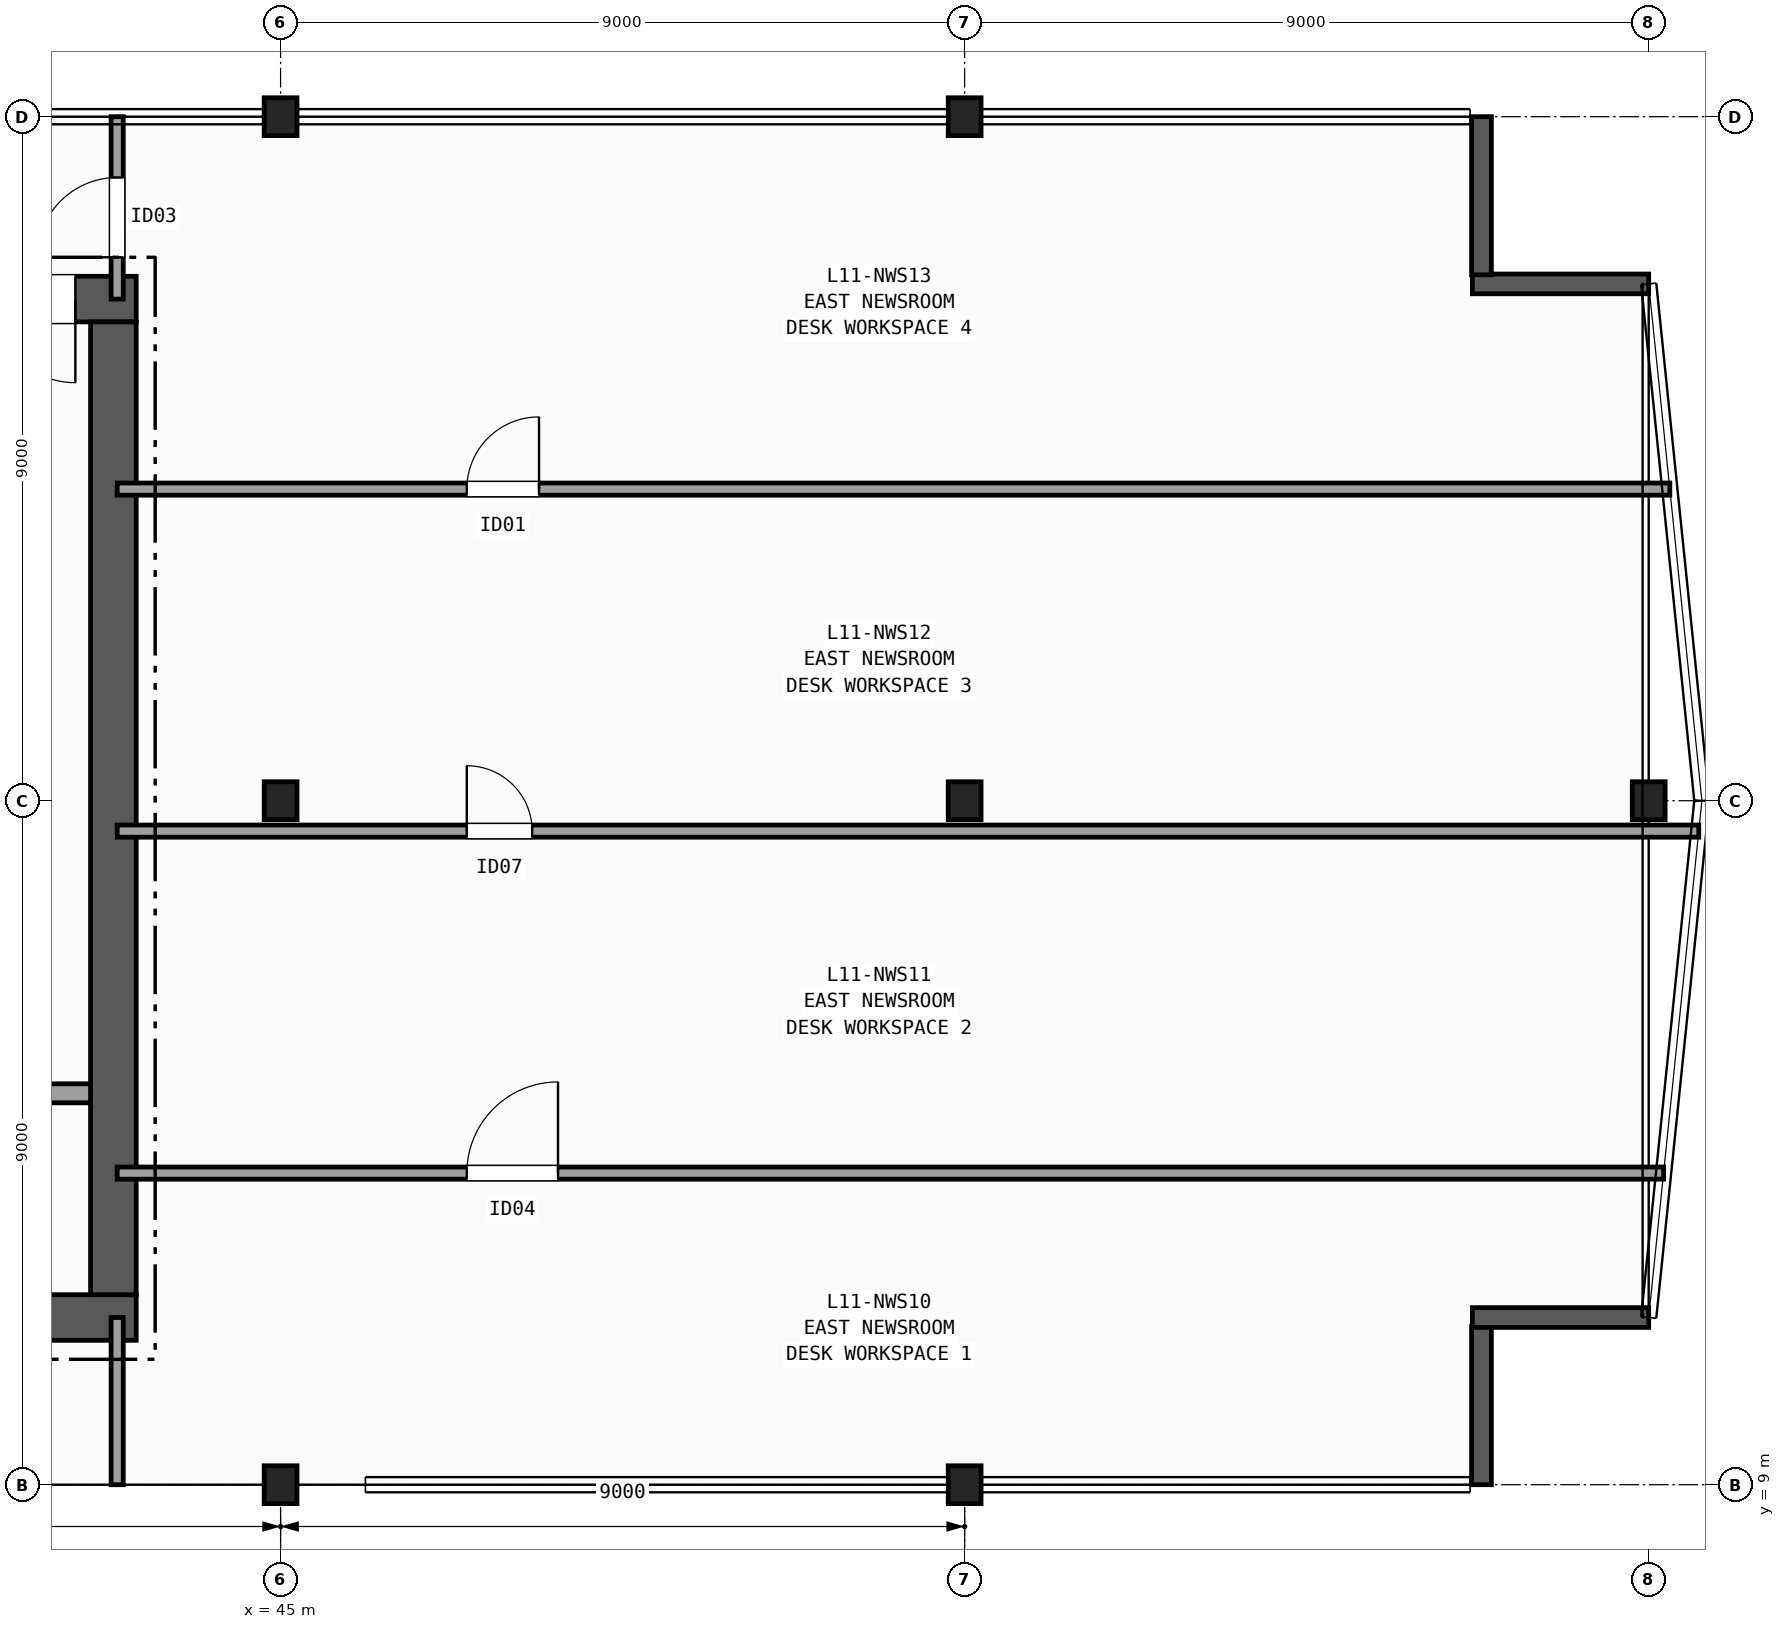
"""IFC4 building model, lengths in metres.
Left out: names, types, materials, properties, quantities, classifications, styles, units other than length and angle.
Written with IfcOpenShell. Run it as: python <this file> out.ifc"""

import sys

from ifc_helpers import new_model, si_unit, direction, frame, frame_2d, origin, origin_2d, place, context, subcontext, project, spatial, rectangle, i_section, extrude, element, fill, save


model = new_model("IFC4")
c1 = context("Model", 3, precision=1e-05, world=origin(), true_north=direction((0.0, 1.0)))
c2 = subcontext(c1, "Body", "Model", "MODEL_VIEW")
j1 = project(units=[si_unit("LENGTHUNIT", "METRE"), si_unit("PLANEANGLEUNIT", "RADIAN")], contexts=[c1])
p1 = place(None, origin())
s1 = spatial("IfcSite", under=j1, at=p1, CompositionType="ELEMENT")
p2 = place(p1, origin())
s2 = spatial("IfcBuilding", under=s1, at=p2, CompositionType="ELEMENT")
p3 = place(p2, frame((0.0, 0.0, 50.8)))
s3 = spatial("IfcBuildingStorey", under=s2, at=p3, CompositionType="ELEMENT", Elevation=50.8)
for number, where, z_axis, x_axis in (
    (1, (45.0, 9.0, 0.0), (0.0, 0.0, 1.0), (1.0, 0.0, 0.0)),
    (2, (45.0, 18.0, 0.0), (0.0, 0.0, 1.0), (1.0, 0.0, 0.0)),
    (3, (45.0, 27.0, 0.0), (0.0, 0.0, 1.0), (1.0, 0.0, 0.0)),
    (4, (54.0, 9.0, 0.0), (0.0, 0.0, 1.0), (1.0, 0.0, 0.0)),
    (5, (54.0, 18.0, 0.0), (0.0, 0.0, 1.0), (1.0, 0.0, 0.0)),
    (6, (54.0, 27.0, 0.0), (0.0, 0.0, 1.0), (1.0, 0.0, 0.0)),
    (7, (63.0, 18.0, 0.0), (0.0, 0.0, 1.0), (1.0, 0.0, 0.0)),
):
    element("IfcColumn", number, at=place(p3, frame(where, z_axis=z_axis, x_axis=x_axis)), inside=s3, PredefinedType="COLUMN", context=c2, shape_type="SweptSolid", body=[
        extrude(i_section(OverallWidth=0.432, OverallDepth=0.498, WebThickness=0.056, FlangeThickness=0.089, FilletRadius=0.015, at=origin_2d()), origin(), (0.0, 0.0, 1.0), 3.7),
    ])
p4 = place(p3, frame((60.8, 9.0, 0.0), z_axis=(0.0, 0.0, 1.0), x_axis=(0.0, 1.0, 0.0)))
e8 = element("IfcWall", 8, at=p4, inside=s3, PredefinedType="SOLIDWALL", context=c2, shape_type="SweptSolid", body=[
    extrude(rectangle(XDim=2.08, YDim=0.26, at=frame_2d((1.04, 0.0))), origin(), (0.0, 0.0, 1.0), 3.42),
])
for number, where, z_axis, x_axis in (
    (9, (60.68, 11.2, 0.0), (0.0, 0.0, 1.0), (1.0, 0.0, 0.0)),
    (10, (63.0, 24.8, 0.0), (0.0, 0.0, 1.0), (-1.0, 0.0, 0.0)),
):
    element("IfcWall", number, at=place(p3, frame(where, z_axis=z_axis, x_axis=x_axis)), inside=s3, PredefinedType="SOLIDWALL", context=c2, shape_type="SweptSolid", body=[
        extrude(rectangle(XDim=2.32, YDim=0.26, at=frame_2d((1.16, 0.0))), origin(), (0.0, 0.0, 1.0), 3.42),
    ])
p5 = place(p3, frame((60.8, 24.92, 0.0), z_axis=(0.0, 0.0, 1.0), x_axis=(0.0, 1.0, 0.0)))
e11 = element("IfcWall", 11, at=p5, inside=s3, PredefinedType="SOLIDWALL", context=c2, shape_type="SweptSolid", body=[
    extrude(rectangle(XDim=2.08, YDim=0.26, at=frame_2d((1.04, 0.0))), origin(), (0.0, 0.0, 1.0), 3.42),
])
p6 = place(p3, frame((29.1, 11.2, 0.0), z_axis=(0.0, 0.0, 1.0), x_axis=(1.0, 0.0, 0.0)))
e12 = element("IfcWall", 12, at=p6, inside=s3, PredefinedType="SHEAR", context=c2, shape_type="SweptSolid", body=[
    extrude(rectangle(XDim=14.0, YDim=0.6, at=frame_2d((7.0, 0.0))), origin(), (0.0, 0.0, 1.0), 3.42),
])
p7 = place(p3, frame((43.1, 24.6, 0.0), z_axis=(0.0, 0.0, 1.0), x_axis=(-1.0, 0.0, 0.0)))
e13 = element("IfcWall", 13, at=p7, inside=s3, PredefinedType="SHEAR", context=c2, shape_type="SweptSolid", body=[
    extrude(rectangle(XDim=14.0, YDim=0.6, at=frame_2d((7.0, 0.0))), origin(), (0.0, 0.0, 1.0), 3.42),
])
p8 = place(p7, frame((0.8, 0.0, 0.0)))
e14 = element("IfcOpeningElement", 14, at=p8, cuts=e13, PredefinedType="OPENING", context=c2, shape_type="SweptSolid", body=[
    extrude(rectangle(XDim=1.1, YDim=2.15, at=frame_2d((0.55, 1.075))), frame((0.0, 0.31, 0.0), z_axis=(0.0, -1.0, 0.0), x_axis=(1.0, 0.0, 0.0)), (0.0, 0.0, 1.0), 0.62),
])
p9 = place(p7, frame((2.75, 0.0, 0.0)))
e15 = element("IfcOpeningElement", 15, at=p9, cuts=e13, PredefinedType="OPENING", context=c2, shape_type="SweptSolid", body=[
    extrude(rectangle(XDim=0.9, YDim=2.1, at=frame_2d((0.45, 1.05))), frame((0.0, 0.31, 0.0), z_axis=(0.0, -1.0, 0.0), x_axis=(1.0, 0.0, 0.0)), (0.0, 0.0, 1.0), 0.62),
])
p10 = place(p7, frame((4.65, 0.0, 0.0)))
e16 = element("IfcOpeningElement", 16, at=p10, cuts=e13, PredefinedType="OPENING", context=c2, shape_type="SweptSolid", body=[
    extrude(rectangle(XDim=0.9, YDim=2.1, at=frame_2d((0.45, 1.05))), frame((0.0, 0.31, 0.0), z_axis=(0.0, -1.0, 0.0), x_axis=(1.0, 0.0, 0.0)), (0.0, 0.0, 1.0), 0.62),
])
p11 = place(p3, frame((42.8, 11.5, 0.0), z_axis=(0.0, 0.0, 1.0), x_axis=(0.0, 1.0, 0.0)))
e17 = element("IfcWall", 17, at=p11, inside=s3, PredefinedType="SHEAR", context=c2, shape_type="SweptSolid", body=[
    extrude(rectangle(XDim=12.8, YDim=0.6, at=frame_2d((6.4, 0.0))), origin(), (0.0, 0.0, 1.0), 3.42),
])
p12 = place(p3, frame((33.07, 14.15, 0.0), z_axis=(0.0, 0.0, 1.0), x_axis=(1.0, 0.0, 0.0)))
e18 = element("IfcWall", 18, at=p12, inside=s3, PredefinedType="PARTITIONING", context=c2, shape_type="SweptSolid", body=[
    extrude(rectangle(XDim=9.43, YDim=0.25, at=frame_2d((4.715, 0.0))), origin(), (0.0, 0.0, 1.0), 3.42),
])
p13 = place(p12, frame((0.755, 0.0, 0.0)))
e19 = element("IfcOpeningElement", 19, at=p13, cuts=e18, PredefinedType="OPENING", context=c2, shape_type="SweptSolid", body=[
    extrude(rectangle(XDim=1.15, YDim=2.15, at=frame_2d((0.575, 1.075))), frame((0.0, 0.135, 0.0), z_axis=(0.0, -1.0, 0.0), x_axis=(1.0, 0.0, 0.0)), (0.0, 0.0, 1.0), 0.27),
])
p14 = place(p12, frame((3.355, 0.0, 0.0)))
e20 = element("IfcOpeningElement", 20, at=p14, cuts=e18, PredefinedType="OPENING", context=c2, shape_type="SweptSolid", body=[
    extrude(rectangle(XDim=1.15, YDim=2.15, at=frame_2d((0.575, 1.075))), frame((0.0, 0.135, 0.0), z_axis=(0.0, -1.0, 0.0), x_axis=(1.0, 0.0, 0.0)), (0.0, 0.0, 1.0), 0.27),
])
p15 = place(p3, frame((42.85, 9.0, 0.0), z_axis=(0.0, 0.0, 1.0), x_axis=(0.0, 1.0, 0.0)))
e21 = element("IfcWall", 21, at=p15, inside=s3, PredefinedType="PARTITIONING", context=c2, shape_type="SweptSolid", body=[
    extrude(rectangle(XDim=2.2, YDim=0.16, at=frame_2d((1.1, 0.0))), origin(), (0.0, 0.0, 1.0), 2.627),
])
p16 = place(p3, frame((42.85, 24.6, 0.0), z_axis=(0.0, 0.0, 1.0), x_axis=(0.0, 1.0, 0.0)))
e22 = element("IfcWall", 22, at=p16, inside=s3, PredefinedType="PARTITIONING", context=c2, shape_type="SweptSolid", body=[
    extrude(rectangle(XDim=2.4, YDim=0.16, at=frame_2d((1.2, 0.0))), origin(), (0.0, 0.0, 1.0), 2.627),
])
p17 = place(p16, frame((0.55, 0.0, 0.0)))
e23 = element("IfcOpeningElement", 23, at=p17, cuts=e22, PredefinedType="OPENING", context=c2, shape_type="SweptSolid", body=[
    extrude(rectangle(XDim=1.05, YDim=2.15, at=frame_2d((0.525, 1.075))), frame((0.0, 0.09, 0.0), z_axis=(0.0, -1.0, 0.0), x_axis=(1.0, 0.0, 0.0)), (0.0, 0.0, 1.0), 0.18),
])
p18 = place(p3, frame((42.85, 13.1, 0.0), z_axis=(0.0, 0.0, 1.0), x_axis=(1.0, 0.0, 0.0)))
e24 = element("IfcWall", 24, at=p18, inside=s3, PredefinedType="PARTITIONING", context=c2, shape_type="SweptSolid", body=[
    extrude(rectangle(XDim=20.346, YDim=0.16, at=frame_2d((10.173, 0.0))), origin(), (0.0, 0.0, 1.0), 3.42),
])
p19 = place(p18, frame((4.6, 0.0, 0.0)))
e25 = element("IfcOpeningElement", 25, at=p19, cuts=e24, PredefinedType="OPENING", context=c2, shape_type="SweptSolid", body=[
    extrude(rectangle(XDim=1.2, YDim=2.15, at=frame_2d((0.6, 1.075))), frame((0.0, 0.09, 0.0), z_axis=(0.0, -1.0, 0.0), x_axis=(1.0, 0.0, 0.0)), (0.0, 0.0, 1.0), 0.18),
])
p20 = place(p3, frame((42.85, 17.6, 0.0), z_axis=(0.0, 0.0, 1.0), x_axis=(1.0, 0.0, 0.0)))
e26 = element("IfcWall", 26, at=p20, inside=s3, PredefinedType="PARTITIONING", context=c2, shape_type="SweptSolid", body=[
    extrude(rectangle(XDim=20.809, YDim=0.16, at=frame_2d((10.404, 0.0))), origin(), (0.0, 0.0, 1.0), 3.42),
])
p21 = place(p20, frame((4.6, 0.0, 0.0)))
e27 = element("IfcOpeningElement", 27, at=p21, cuts=e26, PredefinedType="OPENING", context=c2, shape_type="SweptSolid", body=[
    extrude(rectangle(XDim=0.86, YDim=2.05, at=frame_2d((0.43, 1.025))), frame((0.0, 0.09, 0.0), z_axis=(0.0, -1.0, 0.0), x_axis=(1.0, 0.0, 0.0)), (0.0, 0.0, 1.0), 0.18),
])
p22 = place(p3, frame((42.85, 22.1, 0.0), z_axis=(0.0, 0.0, 1.0), x_axis=(1.0, 0.0, 0.0)))
e28 = element("IfcWall", 28, at=p22, inside=s3, PredefinedType="PARTITIONING", context=c2, shape_type="SweptSolid", body=[
    extrude(rectangle(XDim=20.428, YDim=0.16, at=frame_2d((10.214, 0.0))), origin(), (0.0, 0.0, 1.0), 3.42),
])
p23 = place(p22, frame((4.6, 0.0, 0.0)))
e29 = element("IfcOpeningElement", 29, at=p23, cuts=e28, PredefinedType="OPENING", context=c2, shape_type="SweptSolid", body=[
    extrude(rectangle(XDim=0.95, YDim=2.1, at=frame_2d((0.475, 1.05))), frame((0.0, 0.09, 0.0), z_axis=(0.0, -1.0, 0.0), x_axis=(1.0, 0.0, 0.0)), (0.0, 0.0, 1.0), 0.18),
])
p24 = place(p8, origin())
e30 = element("IfcDoor", 30, at=p24, inside=s3, OperationType="SINGLE_SWING_LEFT", PredefinedType="DOOR", context=c2, shape_type="SweptSolid", body=[
    extrude(rectangle(XDim=1.1, YDim=2.15, at=frame_2d((0.55, 1.075))), frame((0.0, 0.025, 0.0), z_axis=(0.0, -1.0, 0.0), x_axis=(1.0, 0.0, 0.0)), (0.0, 0.0, 1.0), 0.05),
])
fill(e14, e30)
p25 = place(p17, origin())
e31 = element("IfcDoor", 31, at=p25, inside=s3, OperationType="SINGLE_SWING_LEFT", PredefinedType="DOOR", context=c2, shape_type="SweptSolid", body=[
    extrude(rectangle(XDim=1.05, YDim=2.15, at=frame_2d((0.525, 1.075))), frame((0.0, 0.025, 0.0), z_axis=(0.0, -1.0, 0.0), x_axis=(1.0, 0.0, 0.0)), (0.0, 0.0, 1.0), 0.05),
])
fill(e23, e31)
p26 = place(p19, origin())
e32 = element("IfcDoor", 32, at=p26, inside=s3, OperationType="SINGLE_SWING_RIGHT", PredefinedType="DOOR", context=c2, shape_type="SweptSolid", body=[
    extrude(rectangle(XDim=1.2, YDim=2.15, at=frame_2d((0.6, 1.075))), frame((0.0, 0.025, 0.0), z_axis=(0.0, -1.0, 0.0), x_axis=(1.0, 0.0, 0.0)), (0.0, 0.0, 1.0), 0.05),
])
fill(e25, e32)
p27 = place(p21, origin())
e33 = element("IfcDoor", 33, at=p27, inside=s3, OperationType="SINGLE_SWING_LEFT", PredefinedType="DOOR", context=c2, shape_type="SweptSolid", body=[
    extrude(rectangle(XDim=0.86, YDim=2.05, at=frame_2d((0.43, 1.025))), frame((0.0, 0.025, 0.0), z_axis=(0.0, -1.0, 0.0), x_axis=(1.0, 0.0, 0.0)), (0.0, 0.0, 1.0), 0.05),
])
fill(e27, e33)
p28 = place(p23, origin())
e34 = element("IfcDoor", 34, at=p28, inside=s3, OperationType="SINGLE_SWING_RIGHT", PredefinedType="DOOR", context=c2, shape_type="SweptSolid", body=[
    extrude(rectangle(XDim=0.95, YDim=2.1, at=frame_2d((0.475, 1.05))), frame((0.0, 0.025, 0.0), z_axis=(0.0, -1.0, 0.0), x_axis=(1.0, 0.0, 0.0)), (0.0, 0.0, 1.0), 0.05),
])
fill(e29, e34)
save(model, sys.argv[1])
